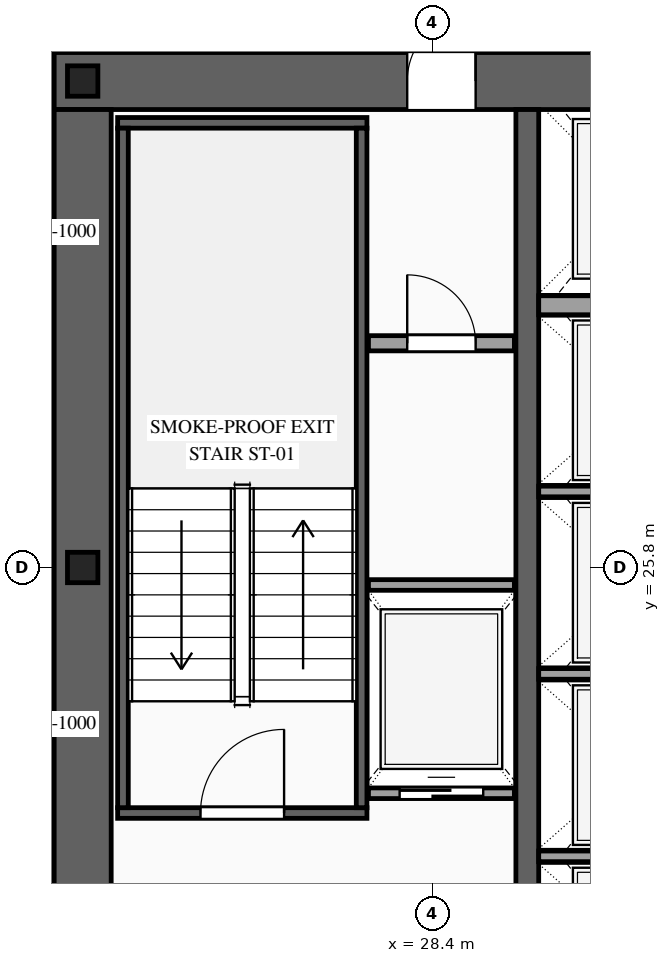
"""IFC4 building model, lengths in metres.
Left out: names, types, materials, properties, quantities, classifications, styles, units other than length and angle.
Written with IfcOpenShell. Run it as: python <this file> out.ifc"""

import sys

from ifc_helpers import new_model, si_unit, direction, frame, frame_2d, origin, origin_2d, place, context, subcontext, project, spatial, rectangle, i_section, extrude, source, transform, mapped, element, fill, save


model = new_model("IFC4")
c1 = context("Model", 3, precision=1e-05, world=origin(), true_north=direction((0.0, 1.0)))
c2 = subcontext(c1, "Body", "Model", "MODEL_VIEW")
j1 = project(units=[si_unit("LENGTHUNIT", "METRE"), si_unit("PLANEANGLEUNIT", "RADIAN")], contexts=[c1])
p1 = place(None, origin())
s1 = spatial("IfcSite", under=j1, at=p1, CompositionType="ELEMENT")
p2 = place(p1, origin())
s2 = spatial("IfcBuilding", under=s1, at=p2, CompositionType="ELEMENT")
p3 = place(p2, frame((0.0, 0.0, 141.6)))
s3 = spatial("IfcBuildingStorey", under=s2, at=p3, CompositionType="ELEMENT", Elevation=141.6)
p4 = place(p3, frame((23.425, 32.2, 0.0), z_axis=(0.0, 0.0, 1.0), x_axis=(1.0, 0.0, 0.0)))
e1 = element("IfcWall", 1, at=p4, inside=s3, PredefinedType="SHEAR", context=c2, shape_type="SweptSolid", body=[
    extrude(rectangle(XDim=27.15, YDim=0.75, at=frame_2d((13.575, 0.0))), origin(), (0.0, 0.0, 1.0), 3.6),
])
p5 = place(p4, frame((4.645, 0.0, 0.0)))
e2 = element("IfcOpeningElement", 2, at=p5, cuts=e1, PredefinedType="OPENING", context=c2, shape_type="SweptSolid", body=[
    extrude(rectangle(XDim=0.9, YDim=2.15, at=frame_2d((0.45, 1.075))), frame((0.0, 0.39, 0.0), z_axis=(0.0, -1.0, 0.0), x_axis=(1.0, 0.0, 0.0)), (0.0, 0.0, 1.0), 0.78),
])
p6 = place(p4, frame((9.925, 0.0, 0.0)))
e3 = element("IfcOpeningElement", 3, at=p6, cuts=e1, PredefinedType="OPENING", context=c2, shape_type="SweptSolid", body=[
    extrude(rectangle(XDim=1.1, YDim=2.2, at=frame_2d((0.55, 1.1))), frame((0.0, 0.39, 0.0), z_axis=(0.0, -1.0, 0.0), x_axis=(1.0, 0.0, 0.0)), (0.0, 0.0, 1.0), 0.78),
])
p7 = place(p4, frame((15.775, 0.0, 0.0)))
e4 = element("IfcOpeningElement", 4, at=p7, cuts=e1, PredefinedType="OPENING", context=c2, shape_type="SweptSolid", body=[
    extrude(rectangle(XDim=1.1, YDim=2.2, at=frame_2d((0.55, 1.1))), frame((0.0, 0.39, 0.0), z_axis=(0.0, -1.0, 0.0), x_axis=(1.0, 0.0, 0.0)), (0.0, 0.0, 1.0), 0.78),
])
p8 = place(p4, frame((18.975, 0.0, 0.0)))
e5 = element("IfcOpeningElement", 5, at=p8, cuts=e1, PredefinedType="OPENING", context=c2, shape_type="SweptSolid", body=[
    extrude(rectangle(XDim=0.9, YDim=2.15, at=frame_2d((0.45, 1.075))), frame((0.0, 0.39, 0.0), z_axis=(0.0, -1.0, 0.0), x_axis=(1.0, 0.0, 0.0)), (0.0, 0.0, 1.0), 0.78),
])
m1 = source(origin(), c2, "Body", "SweptSolid", [
    extrude(rectangle(XDim=12.05, YDim=0.75, at=frame_2d((6.025, 0.0))), origin(), (0.0, 0.0, 1.0), 3.6),
])
p9 = place(p3, frame((23.8, 19.775, 0.0), z_axis=(0.0, 0.0, 1.0), x_axis=(0.0, 1.0, 0.0)))
e6 = element("IfcWall", 6, at=p9, inside=s3, PredefinedType="SHEAR", context=c2, shape_type="MappedRepresentation", body=[
    mapped(m1, transform((0.0, 0.0, 0.0), scale=1.0)),
])
m2 = source(origin(), c2, "Body", "SweptSolid", [
    extrude(rectangle(XDim=12.05, YDim=0.3, at=frame_2d((6.025, 0.0))), origin(), (0.0, 0.0, 1.0), 3.6),
])
p10 = place(p3, frame((29.65, 19.775, 0.0), z_axis=(0.0, 0.0, 1.0), x_axis=(0.0, 1.0, 0.0)))
e7 = element("IfcWall", 7, at=p10, inside=s3, PredefinedType="SOLIDWALL", context=c2, shape_type="MappedRepresentation", body=[
    mapped(m2, transform((0.0, 0.0, 0.0), scale=1.0)),
])
m3 = source(origin(), c2, "Body", "SweptSolid", [
    extrude(i_section(OverallWidth=0.4, OverallDepth=0.4, WebThickness=0.013, FlangeThickness=0.021, at=origin_2d()), origin(), (0.0, 0.0, 1.0), 3.6),
])
for number, where, z_axis, x_axis in (
    (8, (23.8, 25.8, 0.0), (0.0, 0.0, 1.0), (1.0, 0.0, 0.0)),
    (9, (23.8, 32.2, 0.0), (0.0, 0.0, 1.0), (1.0, 0.0, 0.0)),
):
    element("IfcColumn", number, at=place(p3, frame(where, z_axis=z_axis, x_axis=x_axis)), inside=s3, PredefinedType="COLUMN", context=c2, shape_type="MappedRepresentation", body=[
        mapped(m3, transform((0.0, 0.0, 0.0), scale=1.0)),
    ])
p11 = place(p3, frame((27.56, 22.83, 0.0), z_axis=(0.0, 0.0, 1.0), x_axis=(1.0, 0.0, 0.0)))
e10 = element("IfcWall", 10, at=p11, inside=s3, PredefinedType="SOLIDWALL", context=c2, shape_type="SweptSolid", body=[
    extrude(rectangle(XDim=1.92, YDim=0.14, at=frame_2d((0.96, 0.0))), origin(), (0.0, 0.0, 1.0), 3.38),
])
p12 = place(p11, frame((0.41, 0.0, 0.0)))
e11 = element("IfcOpeningElement", 11, at=p12, cuts=e10, PredefinedType="OPENING", context=c2, shape_type="SweptSolid", body=[
    extrude(rectangle(XDim=1.1, YDim=2.2, at=frame_2d((0.55, 1.1))), frame((0.0, 0.085, 0.0), z_axis=(0.0, -1.0, 0.0), x_axis=(1.0, 0.0, 0.0)), (0.0, 0.0, 1.0), 0.17),
])
m4 = source(origin(), c2, "Body", "SweptSolid", [
    extrude(rectangle(XDim=1.92, YDim=0.14, at=frame_2d((0.96, 0.0))), origin(), (0.0, 0.0, 1.0), 3.38),
])
p13 = place(p3, frame((27.56, 25.57, 0.0), z_axis=(0.0, 0.0, 1.0), x_axis=(1.0, 0.0, 0.0)))
e12 = element("IfcWall", 12, at=p13, inside=s3, PredefinedType="SOLIDWALL", context=c2, shape_type="MappedRepresentation", body=[
    mapped(m4, transform((0.0, 0.0, 0.0), scale=1.0)),
])
m5 = source(origin(), c2, "Body", "SweptSolid", [
    extrude(rectangle(XDim=2.5, YDim=0.14, at=frame_2d((1.25, 0.0))), origin(), (0.0, 0.0, 1.0), 3.38),
])
for number, where, z_axis, x_axis in (
    (13, (29.8, 22.0, 0.0), (0.0, 0.0, 1.0), (1.0, 0.0, 0.0)),
    (14, (29.8, 24.4, 0.0), (0.0, 0.0, 1.0), (1.0, 0.0, 0.0)),
    (15, (29.8, 26.8, 0.0), (0.0, 0.0, 1.0), (1.0, 0.0, 0.0)),
):
    element("IfcWall", number, at=place(p3, frame(where, z_axis=z_axis, x_axis=x_axis)), inside=s3, PredefinedType="SOLIDWALL", context=c2, shape_type="MappedRepresentation", body=[
        mapped(m5, transform((0.0, 0.0, 0.0), scale=1.0)),
    ])
m6 = source(origin(), c2, "Body", "SweptSolid", [
    extrude(rectangle(XDim=2.5, YDim=0.25, at=frame_2d((1.25, 0.0))), origin(), (0.0, 0.0, 1.0), 3.38),
])
p14 = place(p3, frame((29.8, 29.25, 0.0), z_axis=(0.0, 0.0, 1.0), x_axis=(1.0, 0.0, 0.0)))
e16 = element("IfcWall", 16, at=p14, inside=s3, PredefinedType="SOLIDWALL", context=c2, shape_type="MappedRepresentation", body=[
    mapped(m6, transform((0.0, 0.0, 0.0), scale=1.0)),
])
p15 = place(p3, frame((24.26, 22.57, 0.0), z_axis=(0.0, 0.0, 1.0), x_axis=(1.0, 0.0, 0.0)))
e17 = element("IfcWall", 17, at=p15, inside=s3, PredefinedType="SOLIDWALL", context=c2, shape_type="SweptSolid", body=[
    extrude(rectangle(XDim=3.28, YDim=0.14, at=frame_2d((1.64, 0.0))), origin(), (0.0, 0.0, 1.0), 3.38),
])
p16 = place(p15, frame((1.09, 0.0, 0.0)))
e18 = element("IfcOpeningElement", 18, at=p16, cuts=e17, PredefinedType="OPENING", context=c2, shape_type="SweptSolid", body=[
    extrude(rectangle(XDim=1.1, YDim=2.2, at=frame_2d((0.55, 1.1))), frame((0.0, 0.085, 0.0), z_axis=(0.0, -1.0, 0.0), x_axis=(1.0, 0.0, 0.0)), (0.0, 0.0, 1.0), 0.17),
])
m7 = source(origin(), c2, "Body", "SweptSolid", [
    extrude(rectangle(XDim=3.28, YDim=0.14, at=frame_2d((1.64, 0.0))), origin(), (0.0, 0.0, 1.0), 3.38),
])
p17 = place(p3, frame((24.26, 31.65, 0.0), z_axis=(0.0, 0.0, 1.0), x_axis=(1.0, 0.0, 0.0)))
e19 = element("IfcWall", 19, at=p17, inside=s3, PredefinedType="SOLIDWALL", context=c2, shape_type="MappedRepresentation", body=[
    mapped(m7, transform((0.0, 0.0, 0.0), scale=1.0)),
])
m8 = source(origin(), c2, "Body", "SweptSolid", [
    extrude(rectangle(XDim=8.94, YDim=0.14, at=frame_2d((4.47, 0.0))), origin(), (0.0, 0.0, 1.0), 3.38),
])
for number, where, z_axis, x_axis in (
    (20, (24.33, 22.64, 0.0), (0.0, 0.0, 1.0), (0.0, 1.0, 0.0)),
    (21, (27.47, 22.64, 0.0), (0.0, 0.0, 1.0), (0.0, 1.0, 0.0)),
):
    element("IfcWall", number, at=place(p3, frame(where, z_axis=z_axis, x_axis=x_axis)), inside=s3, PredefinedType="SOLIDWALL", context=c2, shape_type="MappedRepresentation", body=[
        mapped(m8, transform((0.0, 0.0, 0.0), scale=1.0)),
    ])
p18 = place(p3, frame((27.56, 28.75, 0.0), z_axis=(0.0, 0.0, 1.0), x_axis=(1.0, 0.0, 0.0)))
e22 = element("IfcWall", 22, at=p18, inside=s3, PredefinedType="PARTITIONING", context=c2, shape_type="SweptSolid", body=[
    extrude(rectangle(XDim=1.92, YDim=0.2, at=frame_2d((0.96, 0.0))), origin(), (0.0, 0.0, 1.0), 3.38),
])
p19 = place(p18, frame((0.51, 0.0, 0.0)))
e23 = element("IfcOpeningElement", 23, at=p19, cuts=e22, PredefinedType="OPENING", context=c2, shape_type="SweptSolid", body=[
    extrude(rectangle(XDim=0.9, YDim=2.15, at=frame_2d((0.45, 1.075))), frame((0.0, 0.115, 0.0), z_axis=(0.0, -1.0, 0.0), x_axis=(1.0, 0.0, 0.0)), (0.0, 0.0, 1.0), 0.23),
])
m9 = source(origin(), c2, "Body", "SweptSolid", [
    extrude(rectangle(XDim=1.1, YDim=2.2, at=frame_2d((0.55, 1.1))), frame((0.0, 0.025, 0.0), z_axis=(0.0, -1.0, 0.0), x_axis=(1.0, 0.0, 0.0)), (0.0, 0.0, 1.0), 0.05),
])
p20 = place(p12, origin())
e24 = element("IfcDoor", 24, at=p20, inside=s3, OperationType="SLIDING_TO_LEFT", PredefinedType="DOOR", context=c2, shape_type="MappedRepresentation", body=[
    mapped(m9, transform((0.0, 0.0, 0.0), scale=1.0)),
])
fill(e11, e24)
m10 = source(origin(), c2, "Body", "SweptSolid", [
    extrude(rectangle(XDim=1.1, YDim=2.2, at=frame_2d((0.55, 1.1))), frame((0.0, 0.025, 0.0), z_axis=(0.0, -1.0, 0.0), x_axis=(1.0, 0.0, 0.0)), (0.0, 0.0, 1.0), 0.05),
])
p21 = place(p16, origin())
e25 = element("IfcDoor", 25, at=p21, inside=s3, OperationType="SINGLE_SWING_RIGHT", PredefinedType="DOOR", context=c2, shape_type="MappedRepresentation", body=[
    mapped(m10, transform((0.0, 0.0, 0.0), scale=1.0)),
])
fill(e18, e25)
m11 = source(origin(), c2, "Body", "SweptSolid", [
    extrude(rectangle(XDim=0.9, YDim=2.15, at=frame_2d((0.45, 1.075))), frame((0.0, 0.025, 0.0), z_axis=(0.0, -1.0, 0.0), x_axis=(1.0, 0.0, 0.0)), (0.0, 0.0, 1.0), 0.05),
])
p22 = place(p5, origin())
e26 = element("IfcDoor", 26, at=p22, inside=s3, OperationType="SINGLE_SWING_RIGHT", PredefinedType="DOOR", context=c2, shape_type="MappedRepresentation", body=[
    mapped(m11, transform((0.0, 0.0, 0.0), scale=1.0)),
])
fill(e2, e26)
p23 = place(p19, origin())
e27 = element("IfcDoor", 27, at=p23, inside=s3, OperationType="SINGLE_SWING_LEFT", PredefinedType="DOOR", context=c2, shape_type="MappedRepresentation", body=[
    mapped(m11, transform((0.0, 0.0, 0.0), scale=1.0)),
])
fill(e23, e27)
save(model, sys.argv[1])
